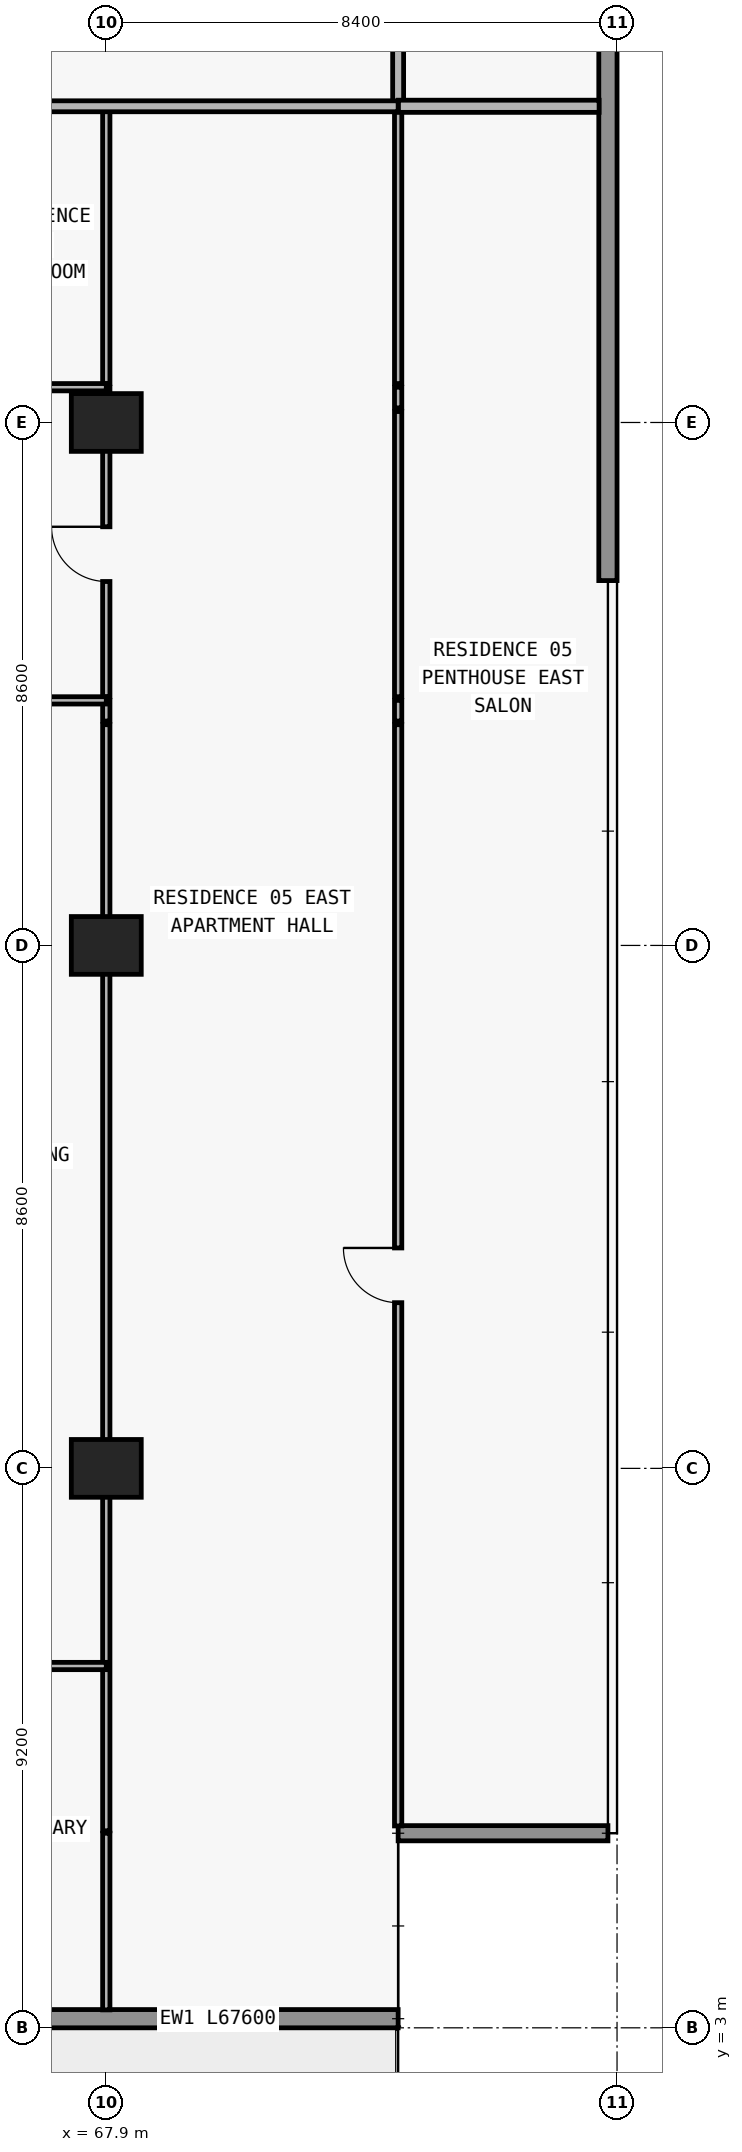
"""IFC4 building model, lengths in metres.
Left out: names, types, materials, properties, quantities, classifications, styles, units other than length and angle.
Written with IfcOpenShell. Run it as: python <this file> out.ifc"""

import sys

from ifc_helpers import new_model, si_unit, direction, frame, frame_2d, origin, origin_2d, place, context, subcontext, project, spatial, rectangle, extrude, element, fill, save


model = new_model("IFC4")
c1 = context("Model", 3, precision=1e-05, world=origin(), true_north=direction((0.0, 1.0)))
c2 = subcontext(c1, "Body", "Model", "MODEL_VIEW")
j1 = project(units=[si_unit("LENGTHUNIT", "METRE"), si_unit("PLANEANGLEUNIT", "RADIAN")], contexts=[c1])
p1 = place(None, origin())
s1 = spatial("IfcSite", under=j1, at=p1, CompositionType="ELEMENT")
p2 = place(p1, origin())
s2 = spatial("IfcBuilding", under=s1, at=p2, CompositionType="ELEMENT")
p3 = place(p2, frame((0.0, 0.0, 49.8)))
s3 = spatial("IfcBuildingStorey", under=s2, at=p3, CompositionType="ELEMENT", Elevation=49.8)
for number, where, z_axis, x_axis in (
    (1, (67.9, 12.2, 0.0), (0.0, 0.0, 1.0), (1.0, 0.0, 0.0)),
    (2, (67.9, 20.8, 0.0), (0.0, 0.0, 1.0), (1.0, 0.0, 0.0)),
    (3, (67.9, 29.4, 0.0), (0.0, 0.0, 1.0), (1.0, 0.0, 0.0)),
):
    element("IfcColumn", number, at=place(p3, frame(where, z_axis=z_axis, x_axis=x_axis)), inside=s3, PredefinedType="COLUMN", context=c2, shape_type="SweptSolid", body=[
        extrude(rectangle(XDim=1.15, YDim=0.95, at=origin_2d()), origin(), (0.0, 0.0, 1.0), 3.05),
    ])
p4 = place(p3, frame((72.7, 3.15, 0.0), z_axis=(0.0, 0.0, 1.0), x_axis=(-1.0, 0.0, 0.0)))
e4 = element("IfcWall", 4, at=p4, inside=s3, PredefinedType="STANDARD", context=c2, shape_type="SweptSolid", body=[
    extrude(rectangle(XDim=67.6, YDim=0.3, at=frame_2d((33.8, 0.0))), origin(), (0.0, 0.0, 1.0), 3.05),
])
p5 = place(p4, frame((59.826, 0.0, 0.0)))
e5 = element("IfcOpeningElement", 5, at=p5, cuts=e4, PredefinedType="OPENING", context=c2, shape_type="SweptSolid", body=[
    extrude(rectangle(XDim=2.0, YDim=2.3, at=frame_2d((1.0, 1.15))), frame((0.0, 0.16, 0.0), z_axis=(0.0, -1.0, 0.0), x_axis=(1.0, 0.0, 0.0)), (0.0, 0.0, 1.0), 0.32),
])
p6 = place(p4, frame((55.526, 0.0, 0.85)))
e6 = element("IfcOpeningElement", 6, at=p6, cuts=e4, PredefinedType="OPENING", context=c2, shape_type="SweptSolid", body=[
    extrude(rectangle(XDim=2.2, YDim=1.55, at=frame_2d((1.1, 0.775))), frame((0.0, 0.16, 0.0), z_axis=(0.0, -1.0, 0.0), x_axis=(1.0, 0.0, 0.0)), (0.0, 0.0, 1.0), 0.32),
])
p7 = place(p4, frame((51.09, 0.0, 0.0)))
e7 = element("IfcOpeningElement", 7, at=p7, cuts=e4, PredefinedType="OPENING", context=c2, shape_type="SweptSolid", body=[
    extrude(rectangle(XDim=2.0, YDim=2.3, at=frame_2d((1.0, 1.15))), frame((0.0, 0.16, 0.0), z_axis=(0.0, -1.0, 0.0), x_axis=(1.0, 0.0, 0.0)), (0.0, 0.0, 1.0), 0.32),
])
p8 = place(p4, frame((46.99, 0.0, 0.85)))
e8 = element("IfcOpeningElement", 8, at=p8, cuts=e4, PredefinedType="OPENING", context=c2, shape_type="SweptSolid", body=[
    extrude(rectangle(XDim=1.8, YDim=1.55, at=frame_2d((0.9, 0.775))), frame((0.0, 0.16, 0.0), z_axis=(0.0, -1.0, 0.0), x_axis=(1.0, 0.0, 0.0)), (0.0, 0.0, 1.0), 0.32),
])
p9 = place(p4, frame((43.09, 0.0, 0.0)))
e9 = element("IfcOpeningElement", 9, at=p9, cuts=e4, PredefinedType="OPENING", context=c2, shape_type="SweptSolid", body=[
    extrude(rectangle(XDim=2.0, YDim=2.3, at=frame_2d((1.0, 1.15))), frame((0.0, 0.16, 0.0), z_axis=(0.0, -1.0, 0.0), x_axis=(1.0, 0.0, 0.0)), (0.0, 0.0, 1.0), 0.32),
])
p10 = place(p4, frame((38.41, 0.0, 0.65)))
e10 = element("IfcOpeningElement", 10, at=p10, cuts=e4, PredefinedType="OPENING", context=c2, shape_type="SweptSolid", body=[
    extrude(rectangle(XDim=2.6, YDim=1.85, at=frame_2d((1.3, 0.925))), frame((0.0, 0.16, 0.0), z_axis=(0.0, -1.0, 0.0), x_axis=(1.0, 0.0, 0.0)), (0.0, 0.0, 1.0), 0.32),
])
p11 = place(p4, frame((32.7, 0.0, 0.85)))
e11 = element("IfcOpeningElement", 11, at=p11, cuts=e4, PredefinedType="OPENING", context=c2, shape_type="SweptSolid", body=[
    extrude(rectangle(XDim=2.2, YDim=1.55, at=frame_2d((1.1, 0.775))), frame((0.0, 0.16, 0.0), z_axis=(0.0, -1.0, 0.0), x_axis=(1.0, 0.0, 0.0)), (0.0, 0.0, 1.0), 0.32),
])
p12 = place(p4, frame((24.7, 0.0, 0.85)))
e12 = element("IfcOpeningElement", 12, at=p12, cuts=e4, PredefinedType="OPENING", context=c2, shape_type="SweptSolid", body=[
    extrude(rectangle(XDim=2.2, YDim=1.55, at=frame_2d((1.1, 0.775))), frame((0.0, 0.16, 0.0), z_axis=(0.0, -1.0, 0.0), x_axis=(1.0, 0.0, 0.0)), (0.0, 0.0, 1.0), 0.32),
])
p13 = place(p4, frame((18.29, 0.0, 0.0)))
e13 = element("IfcOpeningElement", 13, at=p13, cuts=e4, PredefinedType="OPENING", context=c2, shape_type="SweptSolid", body=[
    extrude(rectangle(XDim=2.0, YDim=2.3, at=frame_2d((1.0, 1.15))), frame((0.0, 0.16, 0.0), z_axis=(0.0, -1.0, 0.0), x_axis=(1.0, 0.0, 0.0)), (0.0, 0.0, 1.0), 0.32),
])
p14 = place(p4, frame((14.19, 0.0, 0.85)))
e14 = element("IfcOpeningElement", 14, at=p14, cuts=e4, PredefinedType="OPENING", context=c2, shape_type="SweptSolid", body=[
    extrude(rectangle(XDim=1.8, YDim=1.55, at=frame_2d((0.9, 0.775))), frame((0.0, 0.16, 0.0), z_axis=(0.0, -1.0, 0.0), x_axis=(1.0, 0.0, 0.0)), (0.0, 0.0, 1.0), 0.32),
])
p15 = place(p4, frame((10.226, 0.0, 0.0)))
e15 = element("IfcOpeningElement", 15, at=p15, cuts=e4, PredefinedType="OPENING", context=c2, shape_type="SweptSolid", body=[
    extrude(rectangle(XDim=2.0, YDim=2.3, at=frame_2d((1.0, 1.15))), frame((0.0, 0.16, 0.0), z_axis=(0.0, -1.0, 0.0), x_axis=(1.0, 0.0, 0.0)), (0.0, 0.0, 1.0), 0.32),
])
p16 = place(p4, frame((5.926, 0.0, 0.85)))
e16 = element("IfcOpeningElement", 16, at=p16, cuts=e4, PredefinedType="OPENING", context=c2, shape_type="SweptSolid", body=[
    extrude(rectangle(XDim=2.2, YDim=1.55, at=frame_2d((1.1, 0.775))), frame((0.0, 0.16, 0.0), z_axis=(0.0, -1.0, 0.0), x_axis=(1.0, 0.0, 0.0)), (0.0, 0.0, 1.0), 0.32),
])
p17 = place(p3, frame((72.7, 6.2, 0.0), z_axis=(0.0, 0.0, 1.0), x_axis=(1.0, 0.0, 0.0)))
e17 = element("IfcWall", 17, at=p17, inside=s3, PredefinedType="ELEMENTEDWALL", context=c2, shape_type="SweptSolid", body=[
    extrude(rectangle(XDim=3.45, YDim=0.25, at=frame_2d((1.725, 0.0))), origin(), (0.0, 0.0, 1.0), 3.05),
])
p18 = place(p3, frame((76.15, 47.4, 0.0), z_axis=(0.0, 0.0, 1.0), x_axis=(0.0, -1.0, 0.0)))
e18 = element("IfcWall", 18, at=p18, inside=s3, PredefinedType="STANDARD", context=c2, shape_type="SweptSolid", body=[
    extrude(rectangle(XDim=20.6, YDim=0.3, at=frame_2d((10.3, 0.0))), origin(), (0.0, 0.0, 1.0), 3.05),
])
p19 = place(p3, frame((67.9, 3.295, 0.0), z_axis=(0.0, 0.0, 1.0), x_axis=(0.0, 1.0, 0.0)))
e19 = element("IfcWall", 19, at=p19, inside=s3, PredefinedType="PARTITIONING", context=c2, shape_type="SweptSolid", body=[
    extrude(rectangle(XDim=2.905, YDim=0.12, at=frame_2d((1.453, 0.0))), origin(), (0.0, 0.0, 1.0), 3.05),
])
p20 = place(p3, frame((67.9, 6.24, 0.0), z_axis=(0.0, 0.0, 1.0), x_axis=(0.0, 1.0, 0.0)))
e20 = element("IfcWall", 20, at=p20, inside=s3, PredefinedType="PARTITIONING", context=c2, shape_type="SweptSolid", body=[
    extrude(rectangle(XDim=18.19, YDim=0.12, at=frame_2d((9.095, 0.0))), origin(), (0.0, 0.0, 1.0), 2.11),
])
p21 = place(p3, frame((67.9, 24.49, 0.0), z_axis=(0.0, 0.0, 1.0), x_axis=(0.0, 1.0, 0.0)))
e21 = element("IfcWall", 21, at=p21, inside=s3, PredefinedType="PARTITIONING", context=c2, shape_type="SweptSolid", body=[
    extrude(rectangle(XDim=0.34, YDim=0.12, at=frame_2d((0.17, 0.0))), origin(), (0.0, 0.0, 1.0), 2.11),
])
p22 = place(p3, frame((67.9, 24.89, 0.0), z_axis=(0.0, 0.0, 1.0), x_axis=(0.0, 1.0, 0.0)))
e22 = element("IfcWall", 22, at=p22, inside=s3, PredefinedType="PARTITIONING", context=c2, shape_type="SweptSolid", body=[
    extrude(rectangle(XDim=4.69, YDim=0.12, at=frame_2d((2.345, 0.0))), origin(), (0.0, 0.0, 1.0), 2.11),
])
p23 = place(p22, frame((1.895, 0.0, 0.0)))
e23 = element("IfcOpeningElement", 23, at=p23, cuts=e22, PredefinedType="OPENING", context=c2, shape_type="SweptSolid", body=[
    extrude(rectangle(XDim=0.9, YDim=2.06, at=frame_2d((0.45, 1.03))), frame((0.0, 0.07, 0.0), z_axis=(0.0, -1.0, 0.0), x_axis=(1.0, 0.0, 0.0)), (0.0, 0.0, 1.0), 0.14),
])
p24 = place(p3, frame((67.9, 29.64, 0.0), z_axis=(0.0, 0.0, 1.0), x_axis=(0.0, 1.0, 0.0)))
e24 = element("IfcWall", 24, at=p24, inside=s3, PredefinedType="PARTITIONING", context=c2, shape_type="SweptSolid", body=[
    extrude(rectangle(XDim=0.34, YDim=0.12, at=frame_2d((0.17, 0.0))), origin(), (0.0, 0.0, 1.0), 2.11),
])
p25 = place(p3, frame((67.9, 30.04, 0.0), z_axis=(0.0, 0.0, 1.0), x_axis=(0.0, 1.0, 0.0)))
e25 = element("IfcWall", 25, at=p25, inside=s3, PredefinedType="PARTITIONING", context=c2, shape_type="SweptSolid", body=[
    extrude(rectangle(XDim=4.56, YDim=0.12, at=frame_2d((2.28, 0.0))), origin(), (0.0, 0.0, 1.0), 2.11),
])
p26 = place(p3, frame((72.7, 6.32, 0.0), z_axis=(0.0, 0.0, 1.0), x_axis=(0.0, 1.0, 0.0)))
e26 = element("IfcWall", 26, at=p26, inside=s3, PredefinedType="PARTITIONING", context=c2, shape_type="SweptSolid", body=[
    extrude(rectangle(XDim=18.11, YDim=0.12, at=frame_2d((9.055, 0.0))), origin(), (0.0, 0.0, 1.0), 3.05),
])
p27 = place(p26, frame((8.605, 0.0, 0.0)))
e27 = element("IfcOpeningElement", 27, at=p27, cuts=e26, PredefinedType="OPENING", context=c2, shape_type="SweptSolid", body=[
    extrude(rectangle(XDim=0.9, YDim=2.15, at=frame_2d((0.45, 1.075))), frame((0.0, 0.07, 0.0), z_axis=(0.0, -1.0, 0.0), x_axis=(1.0, 0.0, 0.0)), (0.0, 0.0, 1.0), 0.14),
])
p28 = place(p3, frame((72.7, 24.49, 0.0), z_axis=(0.0, 0.0, 1.0), x_axis=(0.0, 1.0, 0.0)))
e28 = element("IfcWall", 28, at=p28, inside=s3, PredefinedType="PARTITIONING", context=c2, shape_type="SweptSolid", body=[
    extrude(rectangle(XDim=0.34, YDim=0.12, at=frame_2d((0.17, 0.0))), origin(), (0.0, 0.0, 1.0), 3.05),
])
p29 = place(p3, frame((72.7, 24.89, 0.0), z_axis=(0.0, 0.0, 1.0), x_axis=(0.0, 1.0, 0.0)))
e29 = element("IfcWall", 29, at=p29, inside=s3, PredefinedType="PARTITIONING", context=c2, shape_type="SweptSolid", body=[
    extrude(rectangle(XDim=4.69, YDim=0.12, at=frame_2d((2.345, 0.0))), origin(), (0.0, 0.0, 1.0), 3.05),
])
p30 = place(p3, frame((72.7, 29.64, 0.0), z_axis=(0.0, 0.0, 1.0), x_axis=(0.0, 1.0, 0.0)))
e30 = element("IfcWall", 30, at=p30, inside=s3, PredefinedType="PARTITIONING", context=c2, shape_type="SweptSolid", body=[
    extrude(rectangle(XDim=0.34, YDim=0.12, at=frame_2d((0.17, 0.0))), origin(), (0.0, 0.0, 1.0), 3.05),
])
p31 = place(p3, frame((72.7, 30.04, 0.0), z_axis=(0.0, 0.0, 1.0), x_axis=(0.0, 1.0, 0.0)))
e31 = element("IfcWall", 31, at=p31, inside=s3, PredefinedType="PARTITIONING", context=c2, shape_type="SweptSolid", body=[
    extrude(rectangle(XDim=4.56, YDim=0.12, at=frame_2d((2.28, 0.0))), origin(), (0.0, 0.0, 1.0), 3.05),
])
p32 = place(p3, frame((72.7, 34.605, 0.0), z_axis=(0.0, 0.0, 1.0), x_axis=(0.0, 1.0, 0.0)))
e32 = element("IfcWall", 32, at=p32, inside=s3, PredefinedType="PARTITIONING", context=c2, shape_type="SweptSolid", body=[
    extrude(rectangle(XDim=2.295, YDim=0.18, at=frame_2d((1.147, 0.0))), origin(), (0.0, 0.0, 1.0), 3.05),
])
p33 = place(p3, frame((63.448, 8.95, 0.0), z_axis=(0.0, 0.0, 1.0), x_axis=(1.0, 0.0, 0.0)))
e33 = element("IfcWall", 33, at=p33, inside=s3, PredefinedType="PARTITIONING", context=c2, shape_type="SweptSolid", body=[
    extrude(rectangle(XDim=4.452, YDim=0.12, at=frame_2d((2.226, 0.0))), origin(), (0.0, 0.0, 1.0), 3.05),
])
p34 = place(p33, frame((1.776, 0.0, 0.0)))
e34 = element("IfcOpeningElement", 34, at=p34, cuts=e33, PredefinedType="OPENING", context=c2, shape_type="SweptSolid", body=[
    extrude(rectangle(XDim=0.9, YDim=2.15, at=frame_2d((0.45, 1.075))), frame((0.0, 0.07, 0.0), z_axis=(0.0, -1.0, 0.0), x_axis=(1.0, 0.0, 0.0)), (0.0, 0.0, 1.0), 0.14),
])
p35 = place(p3, frame((59.5, 24.83, 0.0), z_axis=(0.0, 0.0, 1.0), x_axis=(1.0, 0.0, 0.0)))
e35 = element("IfcWall", 35, at=p35, inside=s3, PredefinedType="PARTITIONING", context=c2, shape_type="SweptSolid", body=[
    extrude(rectangle(XDim=8.4, YDim=0.12, at=frame_2d((4.2, 0.0))), origin(), (0.0, 0.0, 1.0), 3.05),
])
p36 = place(p35, frame((1.524, 0.0, 0.0)))
e36 = element("IfcOpeningElement", 36, at=p36, cuts=e35, PredefinedType="OPENING", context=c2, shape_type="SweptSolid", body=[
    extrude(rectangle(XDim=0.9, YDim=2.15, at=frame_2d((0.45, 1.075))), frame((0.0, 0.07, 0.0), z_axis=(0.0, -1.0, 0.0), x_axis=(1.0, 0.0, 0.0)), (0.0, 0.0, 1.0), 0.14),
])
p37 = place(p35, frame((6.018, 0.0, 0.0)))
e37 = element("IfcOpeningElement", 37, at=p37, cuts=e35, PredefinedType="OPENING", context=c2, shape_type="SweptSolid", body=[
    extrude(rectangle(XDim=0.9, YDim=2.15, at=frame_2d((0.45, 1.075))), frame((0.0, 0.07, 0.0), z_axis=(0.0, -1.0, 0.0), x_axis=(1.0, 0.0, 0.0)), (0.0, 0.0, 1.0), 0.14),
])
p38 = place(p3, frame((59.5, 29.98, 0.0), z_axis=(0.0, 0.0, 1.0), x_axis=(1.0, 0.0, 0.0)))
e38 = element("IfcWall", 38, at=p38, inside=s3, PredefinedType="PARTITIONING", context=c2, shape_type="SweptSolid", body=[
    extrude(rectangle(XDim=8.4, YDim=0.12, at=frame_2d((4.2, 0.0))), origin(), (0.0, 0.0, 1.0), 3.05),
])
p39 = place(p38, frame((1.818, 0.0, 0.0)))
e39 = element("IfcOpeningElement", 39, at=p39, cuts=e38, PredefinedType="OPENING", context=c2, shape_type="SweptSolid", body=[
    extrude(rectangle(XDim=0.9, YDim=2.15, at=frame_2d((0.45, 1.075))), frame((0.0, 0.07, 0.0), z_axis=(0.0, -1.0, 0.0), x_axis=(1.0, 0.0, 0.0)), (0.0, 0.0, 1.0), 0.14),
])
p40 = place(p3, frame((5.105, 34.6, 0.0), z_axis=(0.0, 0.0, 1.0), x_axis=(1.0, 0.0, 0.0)))
e40 = element("IfcWall", 40, at=p40, inside=s3, PredefinedType="PARTITIONING", context=c2, shape_type="SweptSolid", body=[
    extrude(rectangle(XDim=67.595, YDim=0.18, at=frame_2d((33.797, 0.0))), origin(), (0.0, 0.0, 1.0), 3.05),
])
p41 = place(p40, frame((7.365, 0.0, 0.0)))
e41 = element("IfcOpeningElement", 41, at=p41, cuts=e40, PredefinedType="OPENING", context=c2, shape_type="SweptSolid", body=[
    extrude(rectangle(XDim=1.0, YDim=2.2, at=frame_2d((0.5, 1.1))), frame((0.0, 0.1, 0.0), z_axis=(0.0, -1.0, 0.0), x_axis=(1.0, 0.0, 0.0)), (0.0, 0.0, 1.0), 0.2),
])
p42 = place(p40, frame((15.927, 0.0, 0.0)))
e42 = element("IfcOpeningElement", 42, at=p42, cuts=e40, PredefinedType="OPENING", context=c2, shape_type="SweptSolid", body=[
    extrude(rectangle(XDim=1.0, YDim=2.2, at=frame_2d((0.5, 1.1))), frame((0.0, 0.1, 0.0), z_axis=(0.0, -1.0, 0.0), x_axis=(1.0, 0.0, 0.0)), (0.0, 0.0, 1.0), 0.2),
])
p43 = place(p40, frame((24.407, 0.0, 0.0)))
e43 = element("IfcOpeningElement", 43, at=p43, cuts=e40, PredefinedType="OPENING", context=c2, shape_type="SweptSolid", body=[
    extrude(rectangle(XDim=1.0, YDim=2.2, at=frame_2d((0.5, 1.1))), frame((0.0, 0.1, 0.0), z_axis=(0.0, -1.0, 0.0), x_axis=(1.0, 0.0, 0.0)), (0.0, 0.0, 1.0), 0.2),
])
p44 = place(p40, frame((48.739, 0.0, 0.0)))
e44 = element("IfcOpeningElement", 44, at=p44, cuts=e40, PredefinedType="OPENING", context=c2, shape_type="SweptSolid", body=[
    extrude(rectangle(XDim=1.0, YDim=2.2, at=frame_2d((0.5, 1.1))), frame((0.0, 0.1, 0.0), z_axis=(0.0, -1.0, 0.0), x_axis=(1.0, 0.0, 0.0)), (0.0, 0.0, 1.0), 0.2),
])
p45 = place(p40, frame((56.98, 0.0, 0.0)))
e45 = element("IfcOpeningElement", 45, at=p45, cuts=e40, PredefinedType="OPENING", context=c2, shape_type="SweptSolid", body=[
    extrude(rectangle(XDim=1.0, YDim=2.2, at=frame_2d((0.5, 1.1))), frame((0.0, 0.1, 0.0), z_axis=(0.0, -1.0, 0.0), x_axis=(1.0, 0.0, 0.0)), (0.0, 0.0, 1.0), 0.2),
])
p46 = place(p3, frame((72.705, 34.6, 0.0), z_axis=(0.0, 0.0, 1.0), x_axis=(1.0, 0.0, 0.0)))
e46 = element("IfcWall", 46, at=p46, inside=s3, PredefinedType="PARTITIONING", context=c2, shape_type="SweptSolid", body=[
    extrude(rectangle(XDim=3.3, YDim=0.2, at=frame_2d((1.65, 0.0))), origin(), (0.0, 0.0, 1.0), 3.05),
])
p47 = place(p23, origin())
e47 = element("IfcDoor", 47, at=p47, inside=s3, OperationType="SINGLE_SWING_RIGHT", PredefinedType="DOOR", context=c2, shape_type="SweptSolid", body=[
    extrude(rectangle(XDim=0.9, YDim=2.06, at=frame_2d((0.45, 1.03))), frame((0.0, 0.025, 0.0), z_axis=(0.0, -1.0, 0.0), x_axis=(1.0, 0.0, 0.0)), (0.0, 0.0, 1.0), 0.05),
])
fill(e23, e47)
p48 = place(p27, origin())
e48 = element("IfcDoor", 48, at=p48, inside=s3, OperationType="SINGLE_SWING_RIGHT", PredefinedType="DOOR", context=c2, shape_type="SweptSolid", body=[
    extrude(rectangle(XDim=0.9, YDim=2.15, at=frame_2d((0.45, 1.075))), frame((0.0, 0.025, 0.0), z_axis=(0.0, -1.0, 0.0), x_axis=(1.0, 0.0, 0.0)), (0.0, 0.0, 1.0), 0.05),
])
fill(e27, e48)
save(model, sys.argv[1])
